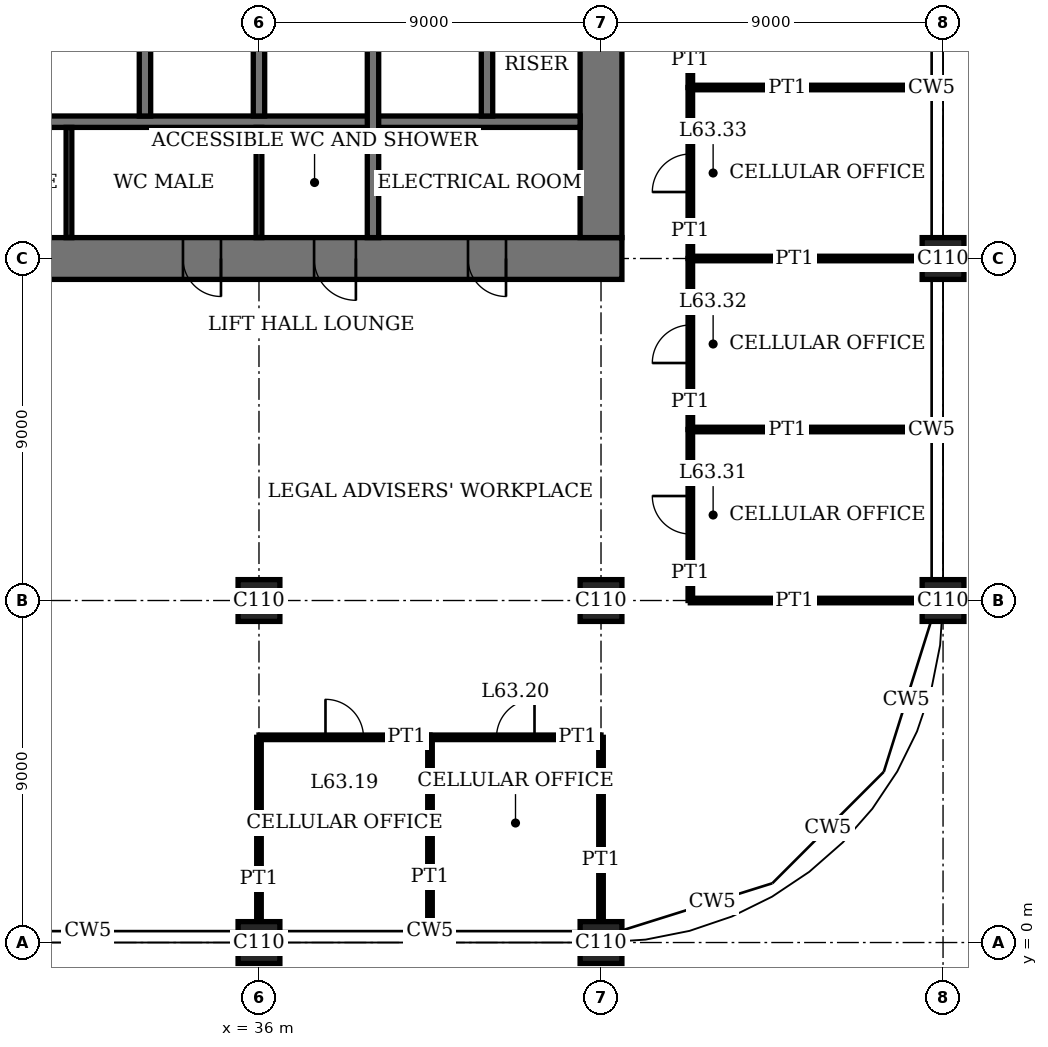
"""IFC4 building model, lengths in metres.
Left out: names, types, materials, properties, quantities, classifications, styles, units other than length and angle.
Written with IfcOpenShell. Run it as: python <this file> out.ifc"""

import sys

from ifc_helpers import new_model, si_unit, direction, frame, frame_2d, origin, origin_2d, place, context, subcontext, project, spatial, rectangle, extrude, element, fill, save


model = new_model("IFC4")
c1 = context("Model", 3, precision=1e-05, world=origin(), true_north=direction((0.0, 1.0)))
c2 = subcontext(c1, "Body", "Model", "MODEL_VIEW")
j1 = project(units=[si_unit("LENGTHUNIT", "METRE"), si_unit("PLANEANGLEUNIT", "RADIAN")], contexts=[c1])
p1 = place(None, origin())
s1 = spatial("IfcSite", under=j1, at=p1, CompositionType="ELEMENT")
p2 = place(p1, origin())
s2 = spatial("IfcBuilding", under=s1, at=p2, CompositionType="ELEMENT")
p3 = place(p2, frame((0.0, 0.0, 259.4)))
s3 = spatial("IfcBuildingStorey", under=s2, at=p3, CompositionType="ELEMENT", Elevation=259.4)
for number, where, z_axis, x_axis in (
    (1, (36.0, 0.0, 0.0), (0.0, 0.0, 1.0), (1.0, 0.0, 0.0)),
    (2, (36.0, 9.0, 0.0), (0.0, 0.0, 1.0), (1.0, 0.0, 0.0)),
    (3, (45.0, 0.0, 0.0), (0.0, 0.0, 1.0), (1.0, 0.0, 0.0)),
    (4, (45.0, 9.0, 0.0), (0.0, 0.0, 1.0), (1.0, 0.0, 0.0)),
    (5, (54.0, 9.0, 0.0), (0.0, 0.0, 1.0), (1.0, 0.0, 0.0)),
    (6, (54.0, 18.0, 0.0), (0.0, 0.0, 1.0), (1.0, 0.0, 0.0)),
):
    element("IfcColumn", number, at=place(p3, frame(where, z_axis=z_axis, x_axis=x_axis)), inside=s3, PredefinedType="COLUMN", context=c2, shape_type="SweptSolid", body=[
        extrude(rectangle(XDim=1.1, YDim=1.1, at=origin_2d()), origin(), (0.0, 0.0, 1.0), 4.0),
    ])
p4 = place(p3, frame((17.45, 18.0, 0.0), z_axis=(0.0, 0.0, 1.0), x_axis=(1.0, 0.0, 0.0)))
e7 = element("IfcWall", 7, at=p4, inside=s3, PredefinedType="SHEAR", context=c2, shape_type="SweptSolid", body=[
    extrude(rectangle(XDim=28.1, YDim=1.1, at=frame_2d((14.05, 0.0))), origin(), (0.0, 0.0, 1.0), 4.0),
])
p5 = place(p4, frame((11.55, 0.0, 0.0)))
e8 = element("IfcOpeningElement", 8, at=p5, cuts=e7, PredefinedType="OPENING", context=c2, shape_type="SweptSolid", body=[
    extrude(rectangle(XDim=1.0, YDim=2.4, at=frame_2d((0.5, 1.2))), frame((0.0, 0.56, 0.0), z_axis=(0.0, -1.0, 0.0), x_axis=(1.0, 0.0, 0.0)), (0.0, 0.0, 1.0), 1.12),
])
p6 = place(p4, frame((16.55, 0.0, 0.0)))
e9 = element("IfcOpeningElement", 9, at=p6, cuts=e7, PredefinedType="OPENING", context=c2, shape_type="SweptSolid", body=[
    extrude(rectangle(XDim=1.0, YDim=2.4, at=frame_2d((0.5, 1.2))), frame((0.0, 0.56, 0.0), z_axis=(0.0, -1.0, 0.0), x_axis=(1.0, 0.0, 0.0)), (0.0, 0.0, 1.0), 1.12),
])
p7 = place(p4, frame((20.0, 0.0, 0.0)))
e10 = element("IfcOpeningElement", 10, at=p7, cuts=e7, PredefinedType="OPENING", context=c2, shape_type="SweptSolid", body=[
    extrude(rectangle(XDim=1.1, YDim=2.4, at=frame_2d((0.55, 1.2))), frame((0.0, 0.56, 0.0), z_axis=(0.0, -1.0, 0.0), x_axis=(1.0, 0.0, 0.0)), (0.0, 0.0, 1.0), 1.12),
])
p8 = place(p4, frame((24.05, 0.0, 0.0)))
e11 = element("IfcOpeningElement", 11, at=p8, cuts=e7, PredefinedType="OPENING", context=c2, shape_type="SweptSolid", body=[
    extrude(rectangle(XDim=1.0, YDim=2.4, at=frame_2d((0.5, 1.2))), frame((0.0, 0.56, 0.0), z_axis=(0.0, -1.0, 0.0), x_axis=(1.0, 0.0, 0.0)), (0.0, 0.0, 1.0), 1.12),
])
p9 = place(p3, frame((45.0, 18.55, 0.0), z_axis=(0.0, 0.0, 1.0), x_axis=(0.0, 1.0, 0.0)))
e12 = element("IfcWall", 12, at=p9, inside=s3, PredefinedType="SHEAR", context=c2, shape_type="SweptSolid", body=[
    extrude(rectangle(XDim=16.9, YDim=1.1, at=frame_2d((8.45, 0.0))), origin(), (0.0, 0.0, 1.0), 4.0),
])
p10 = place(p9, frame((8.45, 0.0, 0.0)))
e13 = element("IfcOpeningElement", 13, at=p10, cuts=e12, PredefinedType="OPENING", context=c2, shape_type="SweptSolid", body=[
    extrude(rectangle(XDim=1.8, YDim=2.4, at=frame_2d((0.9, 1.2))), frame((0.0, 0.56, 0.0), z_axis=(0.0, -1.0, 0.0), x_axis=(1.0, 0.0, 0.0)), (0.0, 0.0, 1.0), 1.12),
])
p11 = place(p3, frame((27.15, 21.6, 0.0), z_axis=(0.0, 0.0, 1.0), x_axis=(1.0, 0.0, 0.0)))
e14 = element("IfcWall", 14, at=p11, inside=s3, PredefinedType="SHEAR", context=c2, shape_type="SweptSolid", body=[
    extrude(rectangle(XDim=17.3, YDim=0.3, at=frame_2d((8.65, 0.0))), origin(), (0.0, 0.0, 1.0), 4.0),
])
for number, where, z_axis, x_axis in (
    (15, (33.0, 21.75, 0.0), (0.0, 0.0, 1.0), (0.0, 1.0, 0.0)),
    (16, (36.0, 21.75, 0.0), (0.0, 0.0, 1.0), (0.0, 1.0, 0.0)),
):
    element("IfcWall", number, at=place(p3, frame(where, z_axis=z_axis, x_axis=x_axis)), inside=s3, PredefinedType="SHEAR", context=c2, shape_type="SweptSolid", body=[
        extrude(rectangle(XDim=2.7, YDim=0.3, at=frame_2d((1.35, 0.0))), origin(), (0.0, 0.0, 1.0), 4.0),
    ])
p12 = place(p3, frame((39.0, 18.55, 0.0), z_axis=(0.0, 0.0, 1.0), x_axis=(0.0, 1.0, 0.0)))
e17 = element("IfcWall", 17, at=p12, inside=s3, PredefinedType="SHEAR", context=c2, shape_type="SweptSolid", body=[
    extrude(rectangle(XDim=5.9, YDim=0.3, at=frame_2d((2.95, 0.0))), origin(), (0.0, 0.0, 1.0), 4.0),
])
p13 = place(p3, frame((42.0, 21.75, 0.0), z_axis=(0.0, 0.0, 1.0), x_axis=(0.0, 1.0, 0.0)))
e18 = element("IfcWall", 18, at=p13, inside=s3, PredefinedType="SHEAR", context=c2, shape_type="SweptSolid", body=[
    extrude(rectangle(XDim=2.7, YDim=0.3, at=frame_2d((1.35, 0.0))), origin(), (0.0, 0.0, 1.0), 4.0),
])
p14 = place(p3, frame((36.0, 5.4, 0.0), z_axis=(0.0, 0.0, 1.0), x_axis=(1.0, 0.0, 0.0)))
e19 = element("IfcWall", 19, at=p14, inside=s3, PredefinedType="PARTITIONING", context=c2, shape_type="SweptSolid", body=[
    extrude(rectangle(XDim=4.5, YDim=0.12, at=frame_2d((2.25, 0.0))), origin(), (0.0, 0.0, 1.0), 3.75),
])
p15 = place(p14, frame((1.75, 0.0, 0.0)))
e20 = element("IfcOpeningElement", 20, at=p15, cuts=e19, PredefinedType="OPENING", context=c2, shape_type="SweptSolid", body=[
    extrude(rectangle(XDim=1.0, YDim=2.4, at=frame_2d((0.5, 1.2))), frame((0.0, 0.07, 0.0), z_axis=(0.0, -1.0, 0.0), x_axis=(1.0, 0.0, 0.0)), (0.0, 0.0, 1.0), 0.14),
])
p16 = place(p3, frame((40.5, 5.4, 0.0), z_axis=(0.0, 0.0, 1.0), x_axis=(1.0, 0.0, 0.0)))
e21 = element("IfcWall", 21, at=p16, inside=s3, PredefinedType="PARTITIONING", context=c2, shape_type="SweptSolid", body=[
    extrude(rectangle(XDim=4.5, YDim=0.12, at=frame_2d((2.25, 0.0))), origin(), (0.0, 0.0, 1.0), 3.75),
])
p17 = place(p16, frame((1.75, 0.0, 0.0)))
e22 = element("IfcOpeningElement", 22, at=p17, cuts=e21, PredefinedType="OPENING", context=c2, shape_type="SweptSolid", body=[
    extrude(rectangle(XDim=1.0, YDim=2.4, at=frame_2d((0.5, 1.2))), frame((0.0, 0.07, 0.0), z_axis=(0.0, -1.0, 0.0), x_axis=(1.0, 0.0, 0.0)), (0.0, 0.0, 1.0), 0.14),
])
p18 = place(p3, frame((47.35, 9.0, 0.0), z_axis=(0.0, 0.0, 1.0), x_axis=(1.0, 0.0, 0.0)))
e23 = element("IfcWall", 23, at=p18, inside=s3, PredefinedType="PARTITIONING", context=c2, shape_type="SweptSolid", body=[
    extrude(rectangle(XDim=6.1, YDim=0.12, at=frame_2d((3.05, 0.0))), origin(), (0.0, 0.0, 1.0), 3.05),
])
p19 = place(p3, frame((47.35, 13.5, 0.0), z_axis=(0.0, 0.0, 1.0), x_axis=(1.0, 0.0, 0.0)))
e24 = element("IfcWall", 24, at=p19, inside=s3, PredefinedType="PARTITIONING", context=c2, shape_type="SweptSolid", body=[
    extrude(rectangle(XDim=6.34, YDim=0.12, at=frame_2d((3.17, 0.0))), origin(), (0.0, 0.0, 1.0), 3.1),
])
p20 = place(p3, frame((47.35, 18.0, 0.0), z_axis=(0.0, 0.0, 1.0), x_axis=(1.0, 0.0, 0.0)))
e25 = element("IfcWall", 25, at=p20, inside=s3, PredefinedType="PARTITIONING", context=c2, shape_type="SweptSolid", body=[
    extrude(rectangle(XDim=6.1, YDim=0.12, at=frame_2d((3.05, 0.0))), origin(), (0.0, 0.0, 1.0), 3.05),
])
p21 = place(p3, frame((47.35, 22.5, 0.0), z_axis=(0.0, 0.0, 1.0), x_axis=(1.0, 0.0, 0.0)))
e26 = element("IfcWall", 26, at=p21, inside=s3, PredefinedType="PARTITIONING", context=c2, shape_type="SweptSolid", body=[
    extrude(rectangle(XDim=6.34, YDim=0.12, at=frame_2d((3.17, 0.0))), origin(), (0.0, 0.0, 1.0), 3.1),
])
p22 = place(p3, frame((36.0, 0.55, 0.0), z_axis=(0.0, 0.0, 1.0), x_axis=(0.0, 1.0, 0.0)))
e27 = element("IfcWall", 27, at=p22, inside=s3, PredefinedType="PARTITIONING", context=c2, shape_type="SweptSolid", body=[
    extrude(rectangle(XDim=4.85, YDim=0.12, at=frame_2d((2.425, 0.0))), origin(), (0.0, 0.0, 1.0), 3.05),
])
p23 = place(p3, frame((40.5, 0.31, 0.0), z_axis=(0.0, 0.0, 1.0), x_axis=(0.0, 1.0, 0.0)))
e28 = element("IfcWall", 28, at=p23, inside=s3, PredefinedType="PARTITIONING", context=c2, shape_type="SweptSolid", body=[
    extrude(rectangle(XDim=5.09, YDim=0.12, at=frame_2d((2.545, 0.0))), origin(), (0.0, 0.0, 1.0), 3.75),
])
p24 = place(p3, frame((45.0, 0.55, 0.0), z_axis=(0.0, 0.0, 1.0), x_axis=(0.0, 1.0, 0.0)))
e29 = element("IfcWall", 29, at=p24, inside=s3, PredefinedType="PARTITIONING", context=c2, shape_type="SweptSolid", body=[
    extrude(rectangle(XDim=4.85, YDim=0.12, at=frame_2d((2.425, 0.0))), origin(), (0.0, 0.0, 1.0), 3.05),
])
p25 = place(p3, frame((47.35, 9.0, 0.0), z_axis=(0.0, 0.0, 1.0), x_axis=(0.0, 1.0, 0.0)))
e30 = element("IfcWall", 30, at=p25, inside=s3, PredefinedType="PARTITIONING", context=c2, shape_type="SweptSolid", body=[
    extrude(rectangle(XDim=4.5, YDim=0.12, at=frame_2d((2.25, 0.0))), origin(), (0.0, 0.0, 1.0), 3.75),
])
p26 = place(p25, frame((1.75, 0.0, 0.0)))
e31 = element("IfcOpeningElement", 31, at=p26, cuts=e30, PredefinedType="OPENING", context=c2, shape_type="SweptSolid", body=[
    extrude(rectangle(XDim=1.0, YDim=2.4, at=frame_2d((0.5, 1.2))), frame((0.0, 0.07, 0.0), z_axis=(0.0, -1.0, 0.0), x_axis=(1.0, 0.0, 0.0)), (0.0, 0.0, 1.0), 0.14),
])
p27 = place(p3, frame((47.35, 13.5, 0.0), z_axis=(0.0, 0.0, 1.0), x_axis=(0.0, 1.0, 0.0)))
e32 = element("IfcWall", 32, at=p27, inside=s3, PredefinedType="PARTITIONING", context=c2, shape_type="SweptSolid", body=[
    extrude(rectangle(XDim=4.5, YDim=0.12, at=frame_2d((2.25, 0.0))), origin(), (0.0, 0.0, 1.0), 3.75),
])
p28 = place(p27, frame((1.75, 0.0, 0.0)))
e33 = element("IfcOpeningElement", 33, at=p28, cuts=e32, PredefinedType="OPENING", context=c2, shape_type="SweptSolid", body=[
    extrude(rectangle(XDim=1.0, YDim=2.4, at=frame_2d((0.5, 1.2))), frame((0.0, 0.07, 0.0), z_axis=(0.0, -1.0, 0.0), x_axis=(1.0, 0.0, 0.0)), (0.0, 0.0, 1.0), 0.14),
])
p29 = place(p3, frame((47.35, 18.0, 0.0), z_axis=(0.0, 0.0, 1.0), x_axis=(0.0, 1.0, 0.0)))
e34 = element("IfcWall", 34, at=p29, inside=s3, PredefinedType="PARTITIONING", context=c2, shape_type="SweptSolid", body=[
    extrude(rectangle(XDim=4.5, YDim=0.12, at=frame_2d((2.25, 0.0))), origin(), (0.0, 0.0, 1.0), 3.75),
])
p30 = place(p29, frame((1.75, 0.0, 0.0)))
e35 = element("IfcOpeningElement", 35, at=p30, cuts=e34, PredefinedType="OPENING", context=c2, shape_type="SweptSolid", body=[
    extrude(rectangle(XDim=1.0, YDim=2.4, at=frame_2d((0.5, 1.2))), frame((0.0, 0.07, 0.0), z_axis=(0.0, -1.0, 0.0), x_axis=(1.0, 0.0, 0.0)), (0.0, 0.0, 1.0), 0.14),
])
p31 = place(p3, frame((47.35, 22.5, 0.0), z_axis=(0.0, 0.0, 1.0), x_axis=(0.0, 1.0, 0.0)))
e36 = element("IfcWall", 36, at=p31, inside=s3, PredefinedType="PARTITIONING", context=c2, shape_type="SweptSolid", body=[
    extrude(rectangle(XDim=4.5, YDim=0.12, at=frame_2d((2.25, 0.0))), origin(), (0.0, 0.0, 1.0), 3.75),
])
p32 = place(p31, frame((1.75, 0.0, 0.0)))
e37 = element("IfcOpeningElement", 37, at=p32, cuts=e36, PredefinedType="OPENING", context=c2, shape_type="SweptSolid", body=[
    extrude(rectangle(XDim=1.0, YDim=2.4, at=frame_2d((0.5, 1.2))), frame((0.0, 0.07, 0.0), z_axis=(0.0, -1.0, 0.0), x_axis=(1.0, 0.0, 0.0)), (0.0, 0.0, 1.0), 0.14),
])
for number, where, z_axis, x_axis in (
    (38, (31.0, 18.55, 0.0), (0.0, 0.0, 1.0), (0.0, 1.0, 0.0)),
    (39, (36.0, 18.55, 0.0), (0.0, 0.0, 1.0), (0.0, 1.0, 0.0)),
):
    element("IfcWall", number, at=place(p3, frame(where, z_axis=z_axis, x_axis=x_axis)), inside=s3, PredefinedType="PARTITIONING", context=c2, shape_type="SweptSolid", body=[
        extrude(rectangle(XDim=2.9, YDim=0.15, at=frame_2d((1.45, 0.0))), origin(), (0.0, 0.0, 1.0), 3.75),
    ])
p33 = place(p6, origin())
e40 = element("IfcDoor", 40, at=p33, inside=s3, OperationType="SINGLE_SWING_RIGHT", PredefinedType="DOOR", context=c2, shape_type="SweptSolid", body=[
    extrude(rectangle(XDim=1.0, YDim=2.4, at=frame_2d((0.5, 1.2))), frame((0.0, 0.025, 0.0), z_axis=(0.0, -1.0, 0.0), x_axis=(1.0, 0.0, 0.0)), (0.0, 0.0, 1.0), 0.05),
    extrude(rectangle(XDim=0.04, YDim=2.4, at=frame_2d((0.02, 1.2))), frame((0.0, 0.4, 0.0), z_axis=(0.0, -1.0, 0.0), x_axis=(1.0, 0.0, 0.0)), (0.0, 0.0, 1.0), 0.8),
    extrude(rectangle(XDim=0.04, YDim=2.4, at=frame_2d((0.98, 1.2))), frame((0.0, 0.4, 0.0), z_axis=(0.0, -1.0, 0.0), x_axis=(1.0, 0.0, 0.0)), (0.0, 0.0, 1.0), 0.8),
    extrude(rectangle(XDim=1.0, YDim=0.04, at=frame_2d((0.5, 2.38))), frame((0.0, 0.4, 0.0), z_axis=(0.0, -1.0, 0.0), x_axis=(1.0, 0.0, 0.0)), (0.0, 0.0, 1.0), 0.8),
])
fill(e9, e40)
p34 = place(p7, origin())
e41 = element("IfcDoor", 41, at=p34, inside=s3, OperationType="SINGLE_SWING_RIGHT", PredefinedType="DOOR", context=c2, shape_type="SweptSolid", body=[
    extrude(rectangle(XDim=1.1, YDim=2.4, at=frame_2d((0.55, 1.2))), frame((0.0, 0.025, 0.0), z_axis=(0.0, -1.0, 0.0), x_axis=(1.0, 0.0, 0.0)), (0.0, 0.0, 1.0), 0.05),
    extrude(rectangle(XDim=0.04, YDim=2.4, at=frame_2d((0.02, 1.2))), frame((0.0, 0.44, 0.0), z_axis=(0.0, -1.0, 0.0), x_axis=(1.0, 0.0, 0.0)), (0.0, 0.0, 1.0), 0.88),
    extrude(rectangle(XDim=0.04, YDim=2.4, at=frame_2d((1.08, 1.2))), frame((0.0, 0.44, 0.0), z_axis=(0.0, -1.0, 0.0), x_axis=(1.0, 0.0, 0.0)), (0.0, 0.0, 1.0), 0.88),
    extrude(rectangle(XDim=1.1, YDim=0.04, at=frame_2d((0.55, 2.38))), frame((0.0, 0.44, 0.0), z_axis=(0.0, -1.0, 0.0), x_axis=(1.0, 0.0, 0.0)), (0.0, 0.0, 1.0), 0.88),
])
fill(e10, e41)
p35 = place(p8, origin())
e42 = element("IfcDoor", 42, at=p35, inside=s3, OperationType="SINGLE_SWING_RIGHT", PredefinedType="DOOR", context=c2, shape_type="SweptSolid", body=[
    extrude(rectangle(XDim=1.0, YDim=2.4, at=frame_2d((0.5, 1.2))), frame((0.0, 0.025, 0.0), z_axis=(0.0, -1.0, 0.0), x_axis=(1.0, 0.0, 0.0)), (0.0, 0.0, 1.0), 0.05),
    extrude(rectangle(XDim=0.04, YDim=2.4, at=frame_2d((0.02, 1.2))), frame((0.0, 0.4, 0.0), z_axis=(0.0, -1.0, 0.0), x_axis=(1.0, 0.0, 0.0)), (0.0, 0.0, 1.0), 0.8),
    extrude(rectangle(XDim=0.04, YDim=2.4, at=frame_2d((0.98, 1.2))), frame((0.0, 0.4, 0.0), z_axis=(0.0, -1.0, 0.0), x_axis=(1.0, 0.0, 0.0)), (0.0, 0.0, 1.0), 0.8),
    extrude(rectangle(XDim=1.0, YDim=0.04, at=frame_2d((0.5, 2.38))), frame((0.0, 0.4, 0.0), z_axis=(0.0, -1.0, 0.0), x_axis=(1.0, 0.0, 0.0)), (0.0, 0.0, 1.0), 0.8),
])
fill(e11, e42)
p36 = place(p15, origin())
e43 = element("IfcDoor", 43, at=p36, inside=s3, OperationType="SINGLE_SWING_RIGHT", PredefinedType="DOOR", context=c2, shape_type="SweptSolid", body=[
    extrude(rectangle(XDim=1.0, YDim=2.4, at=frame_2d((0.5, 1.2))), frame((0.0, 0.025, 0.0), z_axis=(0.0, -1.0, 0.0), x_axis=(1.0, 0.0, 0.0)), (0.0, 0.0, 1.0), 0.05),
])
fill(e20, e43)
p37 = place(p17, origin())
e44 = element("IfcDoor", 44, at=p37, inside=s3, OperationType="SINGLE_SWING_LEFT", PredefinedType="DOOR", context=c2, shape_type="SweptSolid", body=[
    extrude(rectangle(XDim=1.0, YDim=2.4, at=frame_2d((0.5, 1.2))), frame((0.0, 0.025, 0.0), z_axis=(0.0, -1.0, 0.0), x_axis=(1.0, 0.0, 0.0)), (0.0, 0.0, 1.0), 0.05),
])
fill(e22, e44)
p38 = place(p26, origin())
e45 = element("IfcDoor", 45, at=p38, inside=s3, OperationType="SINGLE_SWING_LEFT", PredefinedType="DOOR", context=c2, shape_type="SweptSolid", body=[
    extrude(rectangle(XDim=1.0, YDim=2.4, at=frame_2d((0.5, 1.2))), frame((0.0, 0.025, 0.0), z_axis=(0.0, -1.0, 0.0), x_axis=(1.0, 0.0, 0.0)), (0.0, 0.0, 1.0), 0.05),
])
fill(e31, e45)
p39 = place(p28, origin())
e46 = element("IfcDoor", 46, at=p39, inside=s3, OperationType="SINGLE_SWING_RIGHT", PredefinedType="DOOR", context=c2, shape_type="SweptSolid", body=[
    extrude(rectangle(XDim=1.0, YDim=2.4, at=frame_2d((0.5, 1.2))), frame((0.0, 0.025, 0.0), z_axis=(0.0, -1.0, 0.0), x_axis=(1.0, 0.0, 0.0)), (0.0, 0.0, 1.0), 0.05),
])
fill(e33, e46)
p40 = place(p30, origin())
e47 = element("IfcDoor", 47, at=p40, inside=s3, OperationType="SINGLE_SWING_RIGHT", PredefinedType="DOOR", context=c2, shape_type="SweptSolid", body=[
    extrude(rectangle(XDim=1.0, YDim=2.4, at=frame_2d((0.5, 1.2))), frame((0.0, 0.025, 0.0), z_axis=(0.0, -1.0, 0.0), x_axis=(1.0, 0.0, 0.0)), (0.0, 0.0, 1.0), 0.05),
])
fill(e35, e47)
save(model, sys.argv[1])
